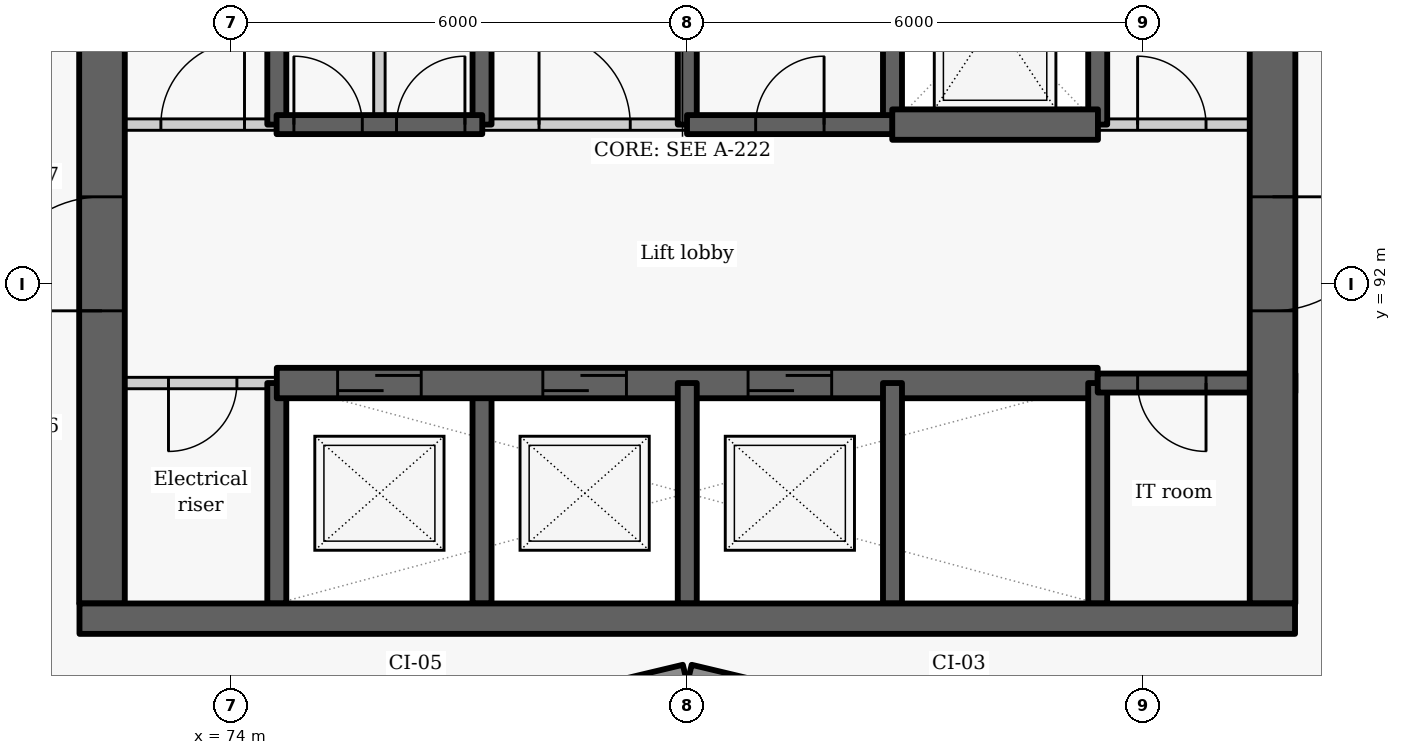
"""IFC4 building model, lengths in metres.
Left out: names, types, materials, properties, quantities, classifications, styles, units other than length and angle.
Written with IfcOpenShell. Run it as: python <this file> out.ifc"""

import sys

from ifc_helpers import new_model, si_unit, direction, frame, frame_2d, origin, place, context, subcontext, project, spatial, rectangle, extrude, element, fill, save


model = new_model("IFC4")
c1 = context("Model", 3, precision=1e-05, world=origin(), true_north=direction((0.0, 1.0)))
c2 = subcontext(c1, "Body", "Model", "MODEL_VIEW")
j1 = project(units=[si_unit("LENGTHUNIT", "METRE"), si_unit("PLANEANGLEUNIT", "RADIAN")], contexts=[c1])
p1 = place(None, origin())
s1 = spatial("IfcSite", under=j1, at=p1, CompositionType="ELEMENT")
p2 = place(p1, origin())
s2 = spatial("IfcBuilding", under=s1, at=p2, CompositionType="ELEMENT")
p3 = place(p2, frame((0.0, 0.0, 117.3)))
s3 = spatial("IfcBuildingStorey", under=s2, at=p3, CompositionType="ELEMENT", Elevation=117.3)
for number, where, z_axis, x_axis in (
    (1, (76.814, 86.119, 0.0), (0.0, 0.0, 1.0), (0.973, 0.232, 0.0)),
    (2, (80.029, 86.872, 0.0), (0.0, 0.0, 1.0), (0.973, -0.232, 0.0)),
):
    element("IfcWall", number, at=place(p3, frame(where, z_axis=z_axis, x_axis=x_axis)), inside=s3, PredefinedType="SOLIDWALL", context=c2, shape_type="SweptSolid", body=[
        extrude(rectangle(XDim=3.246, YDim=0.25, at=frame_2d((1.623, 0.0))), origin(), (0.0, 0.0, 1.0), 2.05),
    ])
p4 = place(p3, frame((74.6, 87.8, -0.275), z_axis=(0.0, 0.0, 1.0), x_axis=(0.0, 1.0, 0.0)))
e3 = element("IfcWall", 3, at=p4, inside=s3, PredefinedType="SHEAR", context=c2, shape_type="SweptSolid", body=[
    extrude(rectangle(XDim=2.9, YDim=0.25, at=frame_2d((1.45, 0.0))), origin(), (0.0, 0.0, 1.0), 3.225),
])
p5 = place(p3, frame((74.6, 94.1, -0.275), z_axis=(0.0, 0.0, 1.0), x_axis=(0.0, 1.0, 0.0)))
e4 = element("IfcWall", 4, at=p5, inside=s3, PredefinedType="SHEAR", context=c2, shape_type="SweptSolid", body=[
    extrude(rectangle(XDim=2.8, YDim=0.25, at=frame_2d((1.4, 0.0))), origin(), (0.0, 0.0, 1.0), 3.225),
])
p6 = place(p3, frame((74.6, 90.7, 0.0), z_axis=(0.0, 0.0, 1.0), x_axis=(-1.0, 0.0, 0.0)))
e5 = element("IfcWall", 5, at=p6, inside=s3, PredefinedType="PARTITIONING", context=c2, shape_type="SweptSolid", body=[
    extrude(rectangle(XDim=2.6, YDim=0.15, at=frame_2d((1.3, 0.0))), origin(), (0.0, 0.0, 1.0), 2.95),
])
p7 = place(p6, frame((0.525, 0.0, 0.0)))
e6 = element("IfcOpeningElement", 6, at=p7, cuts=e5, PredefinedType="OPENING", context=c2, shape_type="SweptSolid", body=[
    extrude(rectangle(XDim=0.9, YDim=2.1, at=frame_2d((0.45, 1.05))), frame((0.0, 0.085, 0.0), z_axis=(0.0, -1.0, 0.0), x_axis=(1.0, 0.0, 0.0)), (0.0, 0.0, 1.0), 0.17),
])
p8 = place(p3, frame((72.3, 87.8, -0.275), z_axis=(0.0, 0.0, 1.0), x_axis=(0.0, 1.0, 0.0)))
e7 = element("IfcWall", 7, at=p8, inside=s3, PredefinedType="SHEAR", context=c2, shape_type="SweptSolid", body=[
    extrude(rectangle(XDim=9.1, YDim=0.6, at=frame_2d((4.55, 0.0))), origin(), (0.0, 0.0, 1.0), 3.225),
])
p9 = place(p8, frame((3.85, 0.0, 0.275)))
e8 = element("IfcOpeningElement", 8, at=p9, cuts=e7, PredefinedType="OPENING", context=c2, shape_type="SweptSolid", body=[
    extrude(rectangle(XDim=1.5, YDim=2.1, at=frame_2d((0.75, 1.05))), frame((0.0, 0.31, 0.0), z_axis=(0.0, -1.0, 0.0), x_axis=(1.0, 0.0, 0.0)), (0.0, 0.0, 1.0), 0.62),
])
p10 = place(p3, frame((77.3, 87.8, -0.275), z_axis=(0.0, 0.0, 1.0), x_axis=(0.0, 1.0, 0.0)))
e9 = element("IfcWall", 9, at=p10, inside=s3, PredefinedType="SHEAR", context=c2, shape_type="SweptSolid", body=[
    extrude(rectangle(XDim=2.9, YDim=0.25, at=frame_2d((1.45, 0.0))), origin(), (0.0, 0.0, 1.0), 3.225),
])
p11 = place(p3, frame((77.3, 94.1, -0.275), z_axis=(0.0, 0.0, 1.0), x_axis=(0.0, 1.0, 0.0)))
e10 = element("IfcWall", 10, at=p11, inside=s3, PredefinedType="SHEAR", context=c2, shape_type="SweptSolid", body=[
    extrude(rectangle(XDim=2.8, YDim=0.25, at=frame_2d((1.4, 0.0))), origin(), (0.0, 0.0, 1.0), 3.225),
])
p12 = place(p3, frame((74.6, 90.7, -0.275), z_axis=(0.0, 0.0, 1.0), x_axis=(1.0, 0.0, 0.0)))
e11 = element("IfcWall", 11, at=p12, inside=s3, PredefinedType="SHEAR", context=c2, shape_type="SweptSolid", body=[
    extrude(rectangle(XDim=10.8, YDim=0.4, at=frame_2d((5.4, 0.0))), origin(), (0.0, 0.0, 1.0), 3.225),
])
p13 = place(p12, frame((0.8, 0.0, 0.275)))
e12 = element("IfcOpeningElement", 12, at=p13, cuts=e11, PredefinedType="OPENING", context=c2, shape_type="SweptSolid", body=[
    extrude(rectangle(XDim=1.1, YDim=2.1, at=frame_2d((0.55, 1.05))), frame((0.0, 0.21, 0.0), z_axis=(0.0, -1.0, 0.0), x_axis=(1.0, 0.0, 0.0)), (0.0, 0.0, 1.0), 0.42),
])
p14 = place(p12, frame((3.5, 0.0, 0.275)))
e13 = element("IfcOpeningElement", 13, at=p14, cuts=e11, PredefinedType="OPENING", context=c2, shape_type="SweptSolid", body=[
    extrude(rectangle(XDim=1.1, YDim=2.1, at=frame_2d((0.55, 1.05))), frame((0.0, 0.21, 0.0), z_axis=(0.0, -1.0, 0.0), x_axis=(1.0, 0.0, 0.0)), (0.0, 0.0, 1.0), 0.42),
])
p15 = place(p12, frame((6.2, 0.0, 0.275)))
e14 = element("IfcOpeningElement", 14, at=p15, cuts=e11, PredefinedType="OPENING", context=c2, shape_type="SweptSolid", body=[
    extrude(rectangle(XDim=1.1, YDim=2.1, at=frame_2d((0.55, 1.05))), frame((0.0, 0.21, 0.0), z_axis=(0.0, -1.0, 0.0), x_axis=(1.0, 0.0, 0.0)), (0.0, 0.0, 1.0), 0.42),
])
p16 = place(p3, frame((80.0, 87.8, -0.275), z_axis=(0.0, 0.0, 1.0), x_axis=(0.0, 1.0, 0.0)))
e15 = element("IfcWall", 15, at=p16, inside=s3, PredefinedType="SHEAR", context=c2, shape_type="SweptSolid", body=[
    extrude(rectangle(XDim=2.9, YDim=0.25, at=frame_2d((1.45, 0.0))), origin(), (0.0, 0.0, 1.0), 3.225),
])
p17 = place(p3, frame((80.0, 94.1, -0.275), z_axis=(0.0, 0.0, 1.0), x_axis=(0.0, 1.0, 0.0)))
e16 = element("IfcWall", 16, at=p17, inside=s3, PredefinedType="SHEAR", context=c2, shape_type="SweptSolid", body=[
    extrude(rectangle(XDim=2.8, YDim=0.25, at=frame_2d((1.4, 0.0))), origin(), (0.0, 0.0, 1.0), 3.225),
])
p18 = place(p3, frame((82.7, 87.8, -0.275), z_axis=(0.0, 0.0, 1.0), x_axis=(0.0, 1.0, 0.0)))
e17 = element("IfcWall", 17, at=p18, inside=s3, PredefinedType="SHEAR", context=c2, shape_type="SweptSolid", body=[
    extrude(rectangle(XDim=2.9, YDim=0.25, at=frame_2d((1.45, 0.0))), origin(), (0.0, 0.0, 1.0), 3.225),
])
p19 = place(p3, frame((82.7, 94.1, -0.275), z_axis=(0.0, 0.0, 1.0), x_axis=(0.0, 1.0, 0.0)))
e18 = element("IfcWall", 18, at=p19, inside=s3, PredefinedType="SHEAR", context=c2, shape_type="SweptSolid", body=[
    extrude(rectangle(XDim=2.8, YDim=0.25, at=frame_2d((1.4, 0.0))), origin(), (0.0, 0.0, 1.0), 3.225),
])
p20 = place(p3, frame((85.4, 87.8, -0.275), z_axis=(0.0, 0.0, 1.0), x_axis=(0.0, 1.0, 0.0)))
e19 = element("IfcWall", 19, at=p20, inside=s3, PredefinedType="SHEAR", context=c2, shape_type="SweptSolid", body=[
    extrude(rectangle(XDim=2.9, YDim=0.25, at=frame_2d((1.45, 0.0))), origin(), (0.0, 0.0, 1.0), 3.225),
])
p21 = place(p3, frame((85.4, 94.1, -0.275), z_axis=(0.0, 0.0, 1.0), x_axis=(0.0, 1.0, 0.0)))
e20 = element("IfcWall", 20, at=p21, inside=s3, PredefinedType="SHEAR", context=c2, shape_type="SweptSolid", body=[
    extrude(rectangle(XDim=2.8, YDim=0.25, at=frame_2d((1.4, 0.0))), origin(), (0.0, 0.0, 1.0), 3.225),
])
p22 = place(p3, frame((88.0, 90.7, -0.275), z_axis=(0.0, 0.0, 1.0), x_axis=(-1.0, 0.0, 0.0)))
e21 = element("IfcWall", 21, at=p22, inside=s3, PredefinedType="SHEAR", context=c2, shape_type="SweptSolid", body=[
    extrude(rectangle(XDim=2.6, YDim=0.25, at=frame_2d((1.3, 0.0))), origin(), (0.0, 0.0, 1.0), 3.225),
])
p23 = place(p22, frame((1.175, 0.0, 0.275)))
e22 = element("IfcOpeningElement", 22, at=p23, cuts=e21, PredefinedType="OPENING", context=c2, shape_type="SweptSolid", body=[
    extrude(rectangle(XDim=0.9, YDim=2.1, at=frame_2d((0.45, 1.05))), frame((0.0, 0.135, 0.0), z_axis=(0.0, -1.0, 0.0), x_axis=(1.0, 0.0, 0.0)), (0.0, 0.0, 1.0), 0.27),
])
p24 = place(p3, frame((87.7, 103.4, -0.275), z_axis=(0.0, 0.0, 1.0), x_axis=(0.0, -1.0, 0.0)))
e23 = element("IfcWall", 23, at=p24, inside=s3, PredefinedType="SHEAR", context=c2, shape_type="SweptSolid", body=[
    extrude(rectangle(XDim=15.6, YDim=0.6, at=frame_2d((7.8, 0.0))), origin(), (0.0, 0.0, 1.0), 3.225),
])
p25 = place(p24, frame((10.25, 0.0, 0.275)))
e24 = element("IfcOpeningElement", 24, at=p25, cuts=e23, PredefinedType="OPENING", context=c2, shape_type="SweptSolid", body=[
    extrude(rectangle(XDim=1.5, YDim=2.1, at=frame_2d((0.75, 1.05))), frame((0.0, 0.31, 0.0), z_axis=(0.0, -1.0, 0.0), x_axis=(1.0, 0.0, 0.0)), (0.0, 0.0, 1.0), 0.62),
])
p26 = place(p24, frame((2.7, 0.0, 0.275)))
e25 = element("IfcOpeningElement", 25, at=p26, cuts=e23, PredefinedType="OPENING", context=c2, shape_type="SweptSolid", body=[
    extrude(rectangle(XDim=1.1, YDim=2.1, at=frame_2d((0.55, 1.05))), frame((0.0, 0.31, 0.0), z_axis=(0.0, -1.0, 0.0), x_axis=(1.0, 0.0, 0.0)), (0.0, 0.0, 1.0), 0.62),
])
p27 = place(p3, frame((72.0, 94.1, 0.0), z_axis=(0.0, 0.0, 1.0), x_axis=(1.0, 0.0, 0.0)))
e26 = element("IfcWall", 26, at=p27, inside=s3, PredefinedType="PARTITIONING", context=c2, shape_type="SweptSolid", body=[
    extrude(rectangle(XDim=2.603, YDim=0.15, at=frame_2d((1.302, 0.0))), origin(), (0.0, 0.0, 1.0), 2.95),
])
p28 = place(p27, frame((1.075, 0.0, 0.0)))
e27 = element("IfcOpeningElement", 27, at=p28, cuts=e26, PredefinedType="OPENING", context=c2, shape_type="SweptSolid", body=[
    extrude(rectangle(XDim=1.1, YDim=2.1, at=frame_2d((0.55, 1.05))), frame((0.0, 0.085, 0.0), z_axis=(0.0, -1.0, 0.0), x_axis=(1.0, 0.0, 0.0)), (0.0, 0.0, 1.0), 0.17),
])
p29 = place(p3, frame((77.297, 94.1, 0.0), z_axis=(0.0, 0.0, 1.0), x_axis=(1.0, 0.0, 0.0)))
e28 = element("IfcWall", 28, at=p29, inside=s3, PredefinedType="PARTITIONING", context=c2, shape_type="SweptSolid", body=[
    extrude(rectangle(XDim=2.706, YDim=0.15, at=frame_2d((1.353, 0.0))), origin(), (0.0, 0.0, 1.0), 2.95),
])
p30 = place(p29, frame((0.753, 0.0, 0.0)))
e29 = element("IfcOpeningElement", 29, at=p30, cuts=e28, PredefinedType="OPENING", context=c2, shape_type="SweptSolid", body=[
    extrude(rectangle(XDim=1.2, YDim=2.1, at=frame_2d((0.6, 1.05))), frame((0.0, 0.085, 0.0), z_axis=(0.0, -1.0, 0.0), x_axis=(1.0, 0.0, 0.0)), (0.0, 0.0, 1.0), 0.17),
])
p31 = place(p3, frame((85.397, 94.1, 0.0), z_axis=(0.0, 0.0, 1.0), x_axis=(1.0, 0.0, 0.0)))
e30 = element("IfcWall", 30, at=p31, inside=s3, PredefinedType="PARTITIONING", context=c2, shape_type="SweptSolid", body=[
    extrude(rectangle(XDim=2.603, YDim=0.15, at=frame_2d((1.302, 0.0))), origin(), (0.0, 0.0, 1.0), 2.95),
])
p32 = place(p31, frame((0.528, 0.0, 0.0)))
e31 = element("IfcOpeningElement", 31, at=p32, cuts=e30, PredefinedType="OPENING", context=c2, shape_type="SweptSolid", body=[
    extrude(rectangle(XDim=0.9, YDim=2.1, at=frame_2d((0.45, 1.05))), frame((0.0, 0.085, 0.0), z_axis=(0.0, -1.0, 0.0), x_axis=(1.0, 0.0, 0.0)), (0.0, 0.0, 1.0), 0.17),
])
p33 = place(p3, frame((74.597, 94.1, -0.275), z_axis=(0.0, 0.0, 1.0), x_axis=(1.0, 0.0, 0.0)))
e32 = element("IfcWall", 32, at=p33, inside=s3, PredefinedType="SHEAR", context=c2, shape_type="SweptSolid", body=[
    extrude(rectangle(XDim=2.706, YDim=0.25, at=frame_2d((1.353, 0.0))), origin(), (0.0, 0.0, 1.0), 3.225),
])
p34 = place(p33, frame((0.228, 0.0, 0.275)))
e33 = element("IfcOpeningElement", 33, at=p34, cuts=e32, PredefinedType="OPENING", context=c2, shape_type="SweptSolid", body=[
    extrude(rectangle(XDim=0.9, YDim=2.1, at=frame_2d((0.45, 1.05))), frame((0.0, 0.135, 0.0), z_axis=(0.0, -1.0, 0.0), x_axis=(1.0, 0.0, 0.0)), (0.0, 0.0, 1.0), 0.27),
])
p35 = place(p33, frame((1.578, 0.0, 0.275)))
e34 = element("IfcOpeningElement", 34, at=p35, cuts=e32, PredefinedType="OPENING", context=c2, shape_type="SweptSolid", body=[
    extrude(rectangle(XDim=0.9, YDim=2.1, at=frame_2d((0.45, 1.05))), frame((0.0, 0.135, 0.0), z_axis=(0.0, -1.0, 0.0), x_axis=(1.0, 0.0, 0.0)), (0.0, 0.0, 1.0), 0.27),
])
p36 = place(p3, frame((79.997, 94.1, -0.275), z_axis=(0.0, 0.0, 1.0), x_axis=(1.0, 0.0, 0.0)))
e35 = element("IfcWall", 35, at=p36, inside=s3, PredefinedType="SHEAR", context=c2, shape_type="SweptSolid", body=[
    extrude(rectangle(XDim=2.706, YDim=0.25, at=frame_2d((1.353, 0.0))), origin(), (0.0, 0.0, 1.0), 3.225),
])
p37 = place(p36, frame((0.903, 0.0, 0.275)))
e36 = element("IfcOpeningElement", 36, at=p37, cuts=e35, PredefinedType="OPENING", context=c2, shape_type="SweptSolid", body=[
    extrude(rectangle(XDim=0.9, YDim=2.1, at=frame_2d((0.45, 1.05))), frame((0.0, 0.135, 0.0), z_axis=(0.0, -1.0, 0.0), x_axis=(1.0, 0.0, 0.0)), (0.0, 0.0, 1.0), 0.27),
])
p38 = place(p3, frame((82.697, 94.1, -0.275), z_axis=(0.0, 0.0, 1.0), x_axis=(1.0, 0.0, 0.0)))
e37 = element("IfcWall", 37, at=p38, inside=s3, PredefinedType="SHEAR", context=c2, shape_type="SweptSolid", body=[
    extrude(rectangle(XDim=2.706, YDim=0.4, at=frame_2d((1.353, 0.0))), origin(), (0.0, 0.0, 1.0), 3.225),
])
p39 = place(p3, frame((75.95, 94.1, 0.0), z_axis=(0.0, 0.0, 1.0), x_axis=(0.0, 1.0, 0.0)))
e38 = element("IfcWall", 38, at=p39, inside=s3, PredefinedType="PARTITIONING", context=c2, shape_type="SweptSolid", body=[
    extrude(rectangle(XDim=2.8, YDim=0.15, at=frame_2d((1.4, 0.0))), origin(), (0.0, 0.0, 1.0), 2.95),
])
p40 = place(p3, frame((72.004, 87.6, -0.275), z_axis=(0.0, 0.0, 1.0), x_axis=(1.0, 0.0, 0.0)))
e39 = element("IfcWall", 39, at=p40, inside=s3, PredefinedType="SHEAR", context=c2, shape_type="SweptSolid", body=[
    extrude(rectangle(XDim=15.992, YDim=0.4, at=frame_2d((7.996, 0.0))), origin(), (0.0, 0.0, 1.0), 3.225),
])
p41 = place(p7, origin())
e40 = element("IfcDoor", 40, at=p41, inside=s3, OperationType="SINGLE_SWING_RIGHT", PredefinedType="DOOR", context=c2, shape_type="SweptSolid", body=[
    extrude(rectangle(XDim=0.9, YDim=2.1, at=frame_2d((0.45, 1.05))), frame((0.0, 0.025, 0.0), z_axis=(0.0, -1.0, 0.0), x_axis=(1.0, 0.0, 0.0)), (0.0, 0.0, 1.0), 0.05),
])
fill(e6, e40)
p42 = place(p13, origin())
e41 = element("IfcDoor", 41, at=p42, inside=s3, OperationType="SLIDING_TO_LEFT", PredefinedType="DOOR", context=c2, shape_type="SweptSolid", body=[
    extrude(rectangle(XDim=1.1, YDim=2.1, at=frame_2d((0.55, 1.05))), frame((0.0, 0.025, 0.0), z_axis=(0.0, -1.0, 0.0), x_axis=(1.0, 0.0, 0.0)), (0.0, 0.0, 1.0), 0.05),
])
fill(e12, e41)
p43 = place(p14, origin())
e42 = element("IfcDoor", 42, at=p43, inside=s3, OperationType="SLIDING_TO_LEFT", PredefinedType="DOOR", context=c2, shape_type="SweptSolid", body=[
    extrude(rectangle(XDim=1.1, YDim=2.1, at=frame_2d((0.55, 1.05))), frame((0.0, 0.025, 0.0), z_axis=(0.0, -1.0, 0.0), x_axis=(1.0, 0.0, 0.0)), (0.0, 0.0, 1.0), 0.05),
])
fill(e13, e42)
p44 = place(p15, origin())
e43 = element("IfcDoor", 43, at=p44, inside=s3, OperationType="SLIDING_TO_LEFT", PredefinedType="DOOR", context=c2, shape_type="SweptSolid", body=[
    extrude(rectangle(XDim=1.1, YDim=2.1, at=frame_2d((0.55, 1.05))), frame((0.0, 0.025, 0.0), z_axis=(0.0, -1.0, 0.0), x_axis=(1.0, 0.0, 0.0)), (0.0, 0.0, 1.0), 0.05),
])
fill(e14, e43)
p45 = place(p23, origin())
e44 = element("IfcDoor", 44, at=p45, inside=s3, OperationType="SINGLE_SWING_LEFT", PredefinedType="DOOR", context=c2, shape_type="SweptSolid", body=[
    extrude(rectangle(XDim=0.9, YDim=2.1, at=frame_2d((0.45, 1.05))), frame((0.0, 0.025, 0.0), z_axis=(0.0, -1.0, 0.0), x_axis=(1.0, 0.0, 0.0)), (0.0, 0.0, 1.0), 0.05),
])
fill(e22, e44)
p46 = place(p28, origin())
e45 = element("IfcDoor", 45, at=p46, inside=s3, OperationType="SINGLE_SWING_RIGHT", PredefinedType="DOOR", context=c2, shape_type="SweptSolid", body=[
    extrude(rectangle(XDim=1.1, YDim=2.1, at=frame_2d((0.55, 1.05))), frame((0.0, 0.025, 0.0), z_axis=(0.0, -1.0, 0.0), x_axis=(1.0, 0.0, 0.0)), (0.0, 0.0, 1.0), 0.05),
])
fill(e27, e45)
p47 = place(p34, origin())
e46 = element("IfcDoor", 46, at=p47, inside=s3, OperationType="SINGLE_SWING_LEFT", PredefinedType="DOOR", context=c2, shape_type="SweptSolid", body=[
    extrude(rectangle(XDim=0.9, YDim=2.1, at=frame_2d((0.45, 1.05))), frame((0.0, 0.025, 0.0), z_axis=(0.0, -1.0, 0.0), x_axis=(1.0, 0.0, 0.0)), (0.0, 0.0, 1.0), 0.05),
])
fill(e33, e46)
p48 = place(p35, origin())
e47 = element("IfcDoor", 47, at=p48, inside=s3, OperationType="SINGLE_SWING_RIGHT", PredefinedType="DOOR", context=c2, shape_type="SweptSolid", body=[
    extrude(rectangle(XDim=0.9, YDim=2.1, at=frame_2d((0.45, 1.05))), frame((0.0, 0.025, 0.0), z_axis=(0.0, -1.0, 0.0), x_axis=(1.0, 0.0, 0.0)), (0.0, 0.0, 1.0), 0.05),
])
fill(e34, e47)
p49 = place(p30, origin())
e48 = element("IfcDoor", 48, at=p49, inside=s3, OperationType="DOUBLE_DOOR_SINGLE_SWING", PredefinedType="DOOR", context=c2, shape_type="SweptSolid", body=[
    extrude(rectangle(XDim=1.2, YDim=2.1, at=frame_2d((0.6, 1.05))), frame((0.0, 0.025, 0.0), z_axis=(0.0, -1.0, 0.0), x_axis=(1.0, 0.0, 0.0)), (0.0, 0.0, 1.0), 0.05),
])
fill(e29, e48)
p50 = place(p37, origin())
e49 = element("IfcDoor", 49, at=p50, inside=s3, OperationType="SINGLE_SWING_RIGHT", PredefinedType="DOOR", context=c2, shape_type="SweptSolid", body=[
    extrude(rectangle(XDim=0.9, YDim=2.1, at=frame_2d((0.45, 1.05))), frame((0.0, 0.025, 0.0), z_axis=(0.0, -1.0, 0.0), x_axis=(1.0, 0.0, 0.0)), (0.0, 0.0, 1.0), 0.05),
])
fill(e36, e49)
p51 = place(p32, origin())
e50 = element("IfcDoor", 50, at=p51, inside=s3, OperationType="SINGLE_SWING_LEFT", PredefinedType="DOOR", context=c2, shape_type="SweptSolid", body=[
    extrude(rectangle(XDim=0.9, YDim=2.1, at=frame_2d((0.45, 1.05))), frame((0.0, 0.025, 0.0), z_axis=(0.0, -1.0, 0.0), x_axis=(1.0, 0.0, 0.0)), (0.0, 0.0, 1.0), 0.05),
])
fill(e31, e50)
p52 = place(p25, origin())
e51 = element("IfcDoor", 51, at=p52, inside=s3, OperationType="DOUBLE_DOOR_SINGLE_SWING", PredefinedType="DOOR", context=c2, shape_type="SweptSolid", body=[
    extrude(rectangle(XDim=1.5, YDim=2.1, at=frame_2d((0.75, 1.05))), frame((0.0, 0.025, 0.0), z_axis=(0.0, -1.0, 0.0), x_axis=(1.0, 0.0, 0.0)), (0.0, 0.0, 1.0), 0.05),
])
fill(e24, e51)
p53 = place(p9, origin())
e52 = element("IfcDoor", 52, at=p53, inside=s3, OperationType="DOUBLE_DOOR_SINGLE_SWING", PredefinedType="DOOR", context=c2, shape_type="SweptSolid", body=[
    extrude(rectangle(XDim=1.5, YDim=2.1, at=frame_2d((0.75, 1.05))), frame((0.0, 0.025, 0.0), z_axis=(0.0, -1.0, 0.0), x_axis=(1.0, 0.0, 0.0)), (0.0, 0.0, 1.0), 0.05),
])
fill(e8, e52)
save(model, sys.argv[1])
